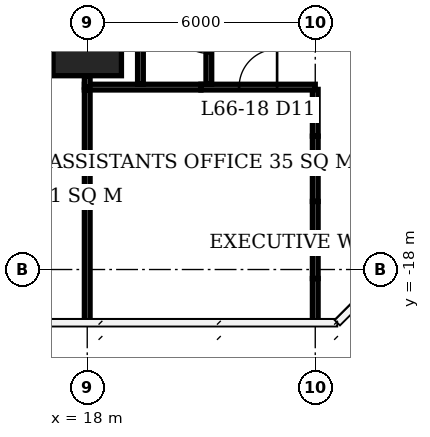
"""IFC4 building model, lengths in metres.
Left out: names, types, materials, properties, quantities, classifications, styles, units other than length and angle.
Written with IfcOpenShell. Run it as: python <this file> out.ifc"""

import sys

from ifc_helpers import new_model, si_unit, direction, frame, frame_2d, origin, origin_2d, place, context, subcontext, project, spatial, rectangle, extrude, element, fill, save


model = new_model("IFC4")
c1 = context("Model", 3, precision=1e-05, world=origin(), true_north=direction((0.0, 1.0)))
c2 = subcontext(c1, "Body", "Model", "MODEL_VIEW")
j1 = project(units=[si_unit("LENGTHUNIT", "METRE"), si_unit("PLANEANGLEUNIT", "RADIAN")], contexts=[c1])
p1 = place(None, origin())
s1 = spatial("IfcSite", under=j1, at=p1, CompositionType="ELEMENT")
p2 = place(p1, origin())
s2 = spatial("IfcBuilding", under=s1, at=p2, CompositionType="ELEMENT")
p3 = place(p2, frame((0.0, 0.0, 268.4)))
s3 = spatial("IfcBuildingStorey", under=s2, at=p3, CompositionType="ELEMENT", Elevation=268.4)
p4 = place(p3, frame((18.0, -12.0, 0.0), z_axis=(0.0, 0.0, 1.0), x_axis=(1.0, 0.0, 0.0)))
e1 = element("IfcColumn", 1, at=p4, inside=s3, PredefinedType="COLUMN", context=c2, shape_type="SweptSolid", body=[
    extrude(rectangle(XDim=1.8, YDim=1.8, at=origin_2d()), origin(), (0.0, 0.0, 1.0), 3.9),
])
p5 = place(p3, frame((17.925, -13.2, 0.0), z_axis=(0.0, 0.0, 1.0), x_axis=(1.0, 0.0, 0.0)))
e2 = element("IfcWall", 2, at=p5, inside=s3, PredefinedType="PARTITIONING", context=c2, shape_type="SweptSolid", body=[
    extrude(rectangle(XDim=3.067, YDim=0.15, at=frame_2d((1.534, 0.0))), origin(), (0.0, 0.0, 1.0), 2.65),
])
p6 = place(p3, frame((20.992, -13.2, 0.0), z_axis=(0.0, 0.0, 1.0), x_axis=(1.0, 0.0, 0.0)))
e3 = element("IfcWall", 3, at=p6, inside=s3, PredefinedType="PARTITIONING", context=c2, shape_type="SweptSolid", body=[
    extrude(rectangle(XDim=3.008, YDim=0.15, at=frame_2d((1.504, 0.0))), origin(), (0.0, 0.0, 1.0), 3.65),
])
p7 = place(p6, frame((1.004, 0.0, 0.0)))
e4 = element("IfcOpeningElement", 4, at=p7, cuts=e3, PredefinedType="OPENING", context=c2, shape_type="SweptSolid", body=[
    extrude(rectangle(XDim=1.0, YDim=2.4, at=frame_2d((0.5, 1.2))), frame((0.0, 0.085, 0.0), z_axis=(0.0, -1.0, 0.0), x_axis=(1.0, 0.0, 0.0)), (0.0, 0.0, 1.0), 0.17),
])
p8 = place(p3, frame((18.0, -19.375, 0.0), z_axis=(0.0, 0.0, 1.0), x_axis=(0.0, 1.0, 0.0)))
e5 = element("IfcWall", 5, at=p8, inside=s3, PredefinedType="PARTITIONING", context=c2, shape_type="SweptSolid", body=[
    extrude(rectangle(XDim=3.065, YDim=0.15, at=frame_2d((1.532, 0.0))), origin(), (0.0, 0.0, 1.0), 3.65),
])
p9 = place(p3, frame((18.0, -16.31, 0.0), z_axis=(0.0, 0.0, 1.0), x_axis=(0.0, 1.0, 0.0)))
e6 = element("IfcWall", 6, at=p9, inside=s3, PredefinedType="PARTITIONING", context=c2, shape_type="SweptSolid", body=[
    extrude(rectangle(XDim=3.035, YDim=0.15, at=frame_2d((1.518, 0.0))), origin(), (0.0, 0.0, 1.0), 2.65),
])
p10 = place(p3, frame((18.0, -13.2, 0.0), z_axis=(0.0, 0.0, 1.0), x_axis=(0.0, 1.0, 0.0)))
e7 = element("IfcWall", 7, at=p10, inside=s3, PredefinedType="PARTITIONING", context=c2, shape_type="SweptSolid", body=[
    extrude(rectangle(XDim=0.3, YDim=0.15, at=frame_2d((0.15, 0.0))), origin(), (0.0, 0.0, 1.0), 2.65),
])
p11 = place(p3, frame((24.0, -19.375, 0.0), z_axis=(0.0, 0.0, 1.0), x_axis=(0.0, 1.0, 0.0)))
e8 = element("IfcWall", 8, at=p11, inside=s3, PredefinedType="PARTITIONING", context=c2, shape_type="SweptSolid", body=[
    extrude(rectangle(XDim=1.138, YDim=0.15, at=frame_2d((0.569, 0.0))), origin(), (0.0, 0.0, 1.0), 3.65),
])
p12 = place(p3, frame((24.0, -18.237, 0.0), z_axis=(0.0, 0.0, 1.0), x_axis=(0.0, 1.0, 0.0)))
e9 = element("IfcWall", 9, at=p12, inside=s3, PredefinedType="PARTITIONING", context=c2, shape_type="SweptSolid", body=[
    extrude(rectangle(XDim=2.029, YDim=0.15, at=frame_2d((1.015, 0.0))), origin(), (0.0, 0.0, 1.0), 2.65),
])
p13 = place(p3, frame((24.0, -16.208, 0.0), z_axis=(0.0, 0.0, 1.0), x_axis=(0.0, 1.0, 0.0)))
e10 = element("IfcWall", 10, at=p13, inside=s3, PredefinedType="PARTITIONING", context=c2, shape_type="SweptSolid", body=[
    extrude(rectangle(XDim=1.718, YDim=0.15, at=frame_2d((0.859, 0.0))), origin(), (0.0, 0.0, 1.0), 3.65),
])
p14 = place(p3, frame((24.0, -14.49, 0.0), z_axis=(0.0, 0.0, 1.0), x_axis=(0.0, 1.0, 0.0)))
e11 = element("IfcWall", 11, at=p14, inside=s3, PredefinedType="PARTITIONING", context=c2, shape_type="SweptSolid", body=[
    extrude(rectangle(XDim=1.23, YDim=0.15, at=frame_2d((0.615, 0.0))), origin(), (0.0, 0.0, 1.0), 2.65),
])
p15 = place(p3, frame((19.4, -13.125, 0.0), z_axis=(0.0, 0.0, 1.0), x_axis=(0.0, 1.0, 0.0)))
e12 = element("IfcWall", 12, at=p15, inside=s3, PredefinedType="PARTITIONING", context=c2, shape_type="SweptSolid", body=[
    extrude(rectangle(XDim=1.517, YDim=0.15, at=frame_2d((0.759, 0.0))), origin(), (0.0, 0.0, 1.0), 2.65),
])
p16 = place(p3, frame((21.2, -13.125, 0.0), z_axis=(0.0, 0.0, 1.0), x_axis=(0.0, 1.0, 0.0)))
e13 = element("IfcWall", 13, at=p16, inside=s3, PredefinedType="PARTITIONING", context=c2, shape_type="SweptSolid", body=[
    extrude(rectangle(XDim=2.55, YDim=0.15, at=frame_2d((1.275, 0.0))), origin(), (0.0, 0.0, 1.0), 3.65),
])
p17 = place(p16, frame((0.812, 0.0, 0.0)))
e14 = element("IfcOpeningElement", 14, at=p17, cuts=e13, PredefinedType="OPENING", context=c2, shape_type="SweptSolid", body=[
    extrude(rectangle(XDim=1.0, YDim=2.4, at=frame_2d((0.5, 1.2))), frame((0.0, 0.085, 0.0), z_axis=(0.0, -1.0, 0.0), x_axis=(1.0, 0.0, 0.0)), (0.0, 0.0, 1.0), 0.17),
])
p18 = place(p7, origin())
e15 = element("IfcDoor", 15, at=p18, inside=s3, OperationType="SINGLE_SWING_RIGHT", PredefinedType="DOOR", context=c2, shape_type="SweptSolid", body=[
    extrude(rectangle(XDim=1.0, YDim=2.4, at=frame_2d((0.5, 1.2))), frame((0.0, 0.025, 0.0), z_axis=(0.0, -1.0, 0.0), x_axis=(1.0, 0.0, 0.0)), (0.0, 0.0, 1.0), 0.05),
])
fill(e4, e15)
p19 = place(p17, origin())
e16 = element("IfcDoor", 16, at=p19, inside=s3, OperationType="SINGLE_SWING_RIGHT", PredefinedType="DOOR", context=c2, shape_type="SweptSolid", body=[
    extrude(rectangle(XDim=1.0, YDim=2.4, at=frame_2d((0.5, 1.2))), frame((0.0, 0.025, 0.0), z_axis=(0.0, -1.0, 0.0), x_axis=(1.0, 0.0, 0.0)), (0.0, 0.0, 1.0), 0.05),
])
fill(e14, e16)
save(model, sys.argv[1])
